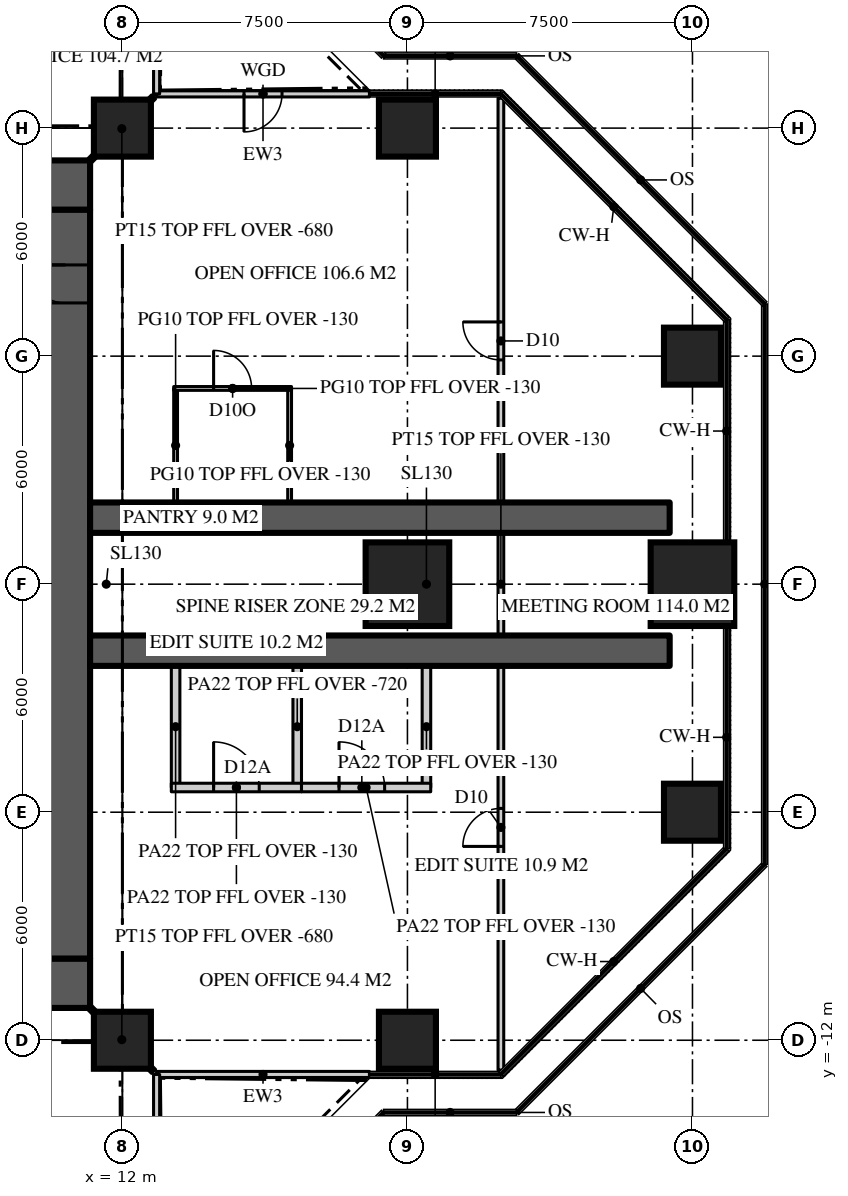
"""IFC4 building model, lengths in metres.
Left out: names, types, materials, properties, quantities, classifications, styles, units other than length and angle.
Written with IfcOpenShell. Run it as: python <this file> out.ifc"""

import sys

from ifc_helpers import new_model, si_unit, direction, frame, frame_2d, origin, origin_2d, place, context, subcontext, project, spatial, rectangle, extrude, element, fill, save


model = new_model("IFC4")
c1 = context("Model", 3, precision=1e-05, world=origin(), true_north=direction((0.0, 1.0)))
c2 = subcontext(c1, "Body", "Model", "MODEL_VIEW")
j1 = project(units=[si_unit("LENGTHUNIT", "METRE"), si_unit("PLANEANGLEUNIT", "RADIAN")], contexts=[c1])
p1 = place(None, origin())
s1 = spatial("IfcSite", under=j1, at=p1, CompositionType="ELEMENT")
p2 = place(p1, origin())
s2 = spatial("IfcBuilding", under=s1, at=p2, CompositionType="ELEMENT")
p3 = place(p2, frame((0.0, 0.0, 228.3)))
s3 = spatial("IfcBuildingStorey", under=s2, at=p3, CompositionType="ELEMENT", Elevation=228.3)
p4 = place(p3, frame((-11.15, 10.5, 0.0), z_axis=(0.0, 0.0, 1.0), x_axis=(1.0, 0.0, 0.0)))
e1 = element("IfcWall", 1, at=p4, inside=s3, PredefinedType="SHEAR", context=c2, shape_type="SweptSolid", body=[
    extrude(rectangle(XDim=22.3, YDim=1.3, at=frame_2d((11.15, 0.0))), origin(), (0.0, 0.0, 1.0), 3.9),
])
p5 = place(p4, frame((4.25, 0.0, 0.0)))
e2 = element("IfcOpeningElement", 2, at=p5, cuts=e1, PredefinedType="OPENING", context=c2, shape_type="SweptSolid", body=[
    extrude(rectangle(XDim=1.8, YDim=2.2, at=frame_2d((0.9, 1.1))), frame((0.0, 0.66, 0.0), z_axis=(0.0, -1.0, 0.0), x_axis=(1.0, 0.0, 0.0)), (0.0, 0.0, 1.0), 1.32),
])
p6 = place(p4, frame((16.25, 0.0, 0.0)))
e3 = element("IfcOpeningElement", 3, at=p6, cuts=e1, PredefinedType="OPENING", context=c2, shape_type="SweptSolid", body=[
    extrude(rectangle(XDim=1.8, YDim=2.2, at=frame_2d((0.9, 1.1))), frame((0.0, 0.66, 0.0), z_axis=(0.0, -1.0, 0.0), x_axis=(1.0, 0.0, 0.0)), (0.0, 0.0, 1.0), 1.32),
])
p7 = place(p3, frame((11.15, -10.5, 0.0), z_axis=(0.0, 0.0, 1.0), x_axis=(-1.0, 0.0, 0.0)))
e4 = element("IfcWall", 4, at=p7, inside=s3, PredefinedType="SHEAR", context=c2, shape_type="SweptSolid", body=[
    extrude(rectangle(XDim=22.3, YDim=1.3, at=frame_2d((11.15, 0.0))), origin(), (0.0, 0.0, 1.0), 3.9),
])
p8 = place(p7, frame((16.25, 0.0, 0.0)))
e5 = element("IfcOpeningElement", 5, at=p8, cuts=e4, PredefinedType="OPENING", context=c2, shape_type="SweptSolid", body=[
    extrude(rectangle(XDim=1.8, YDim=2.2, at=frame_2d((0.9, 1.1))), frame((0.0, 0.66, 0.0), z_axis=(0.0, -1.0, 0.0), x_axis=(1.0, 0.0, 0.0)), (0.0, 0.0, 1.0), 1.32),
])
p9 = place(p7, frame((4.25, 0.0, 0.0)))
e6 = element("IfcOpeningElement", 6, at=p9, cuts=e4, PredefinedType="OPENING", context=c2, shape_type="SweptSolid", body=[
    extrude(rectangle(XDim=1.8, YDim=2.2, at=frame_2d((0.9, 1.1))), frame((0.0, 0.66, 0.0), z_axis=(0.0, -1.0, 0.0), x_axis=(1.0, 0.0, 0.0)), (0.0, 0.0, 1.0), 1.32),
])
p10 = place(p3, frame((10.5, -9.85, 0.0), z_axis=(0.0, 0.0, 1.0), x_axis=(0.0, 1.0, 0.0)))
e7 = element("IfcWall", 7, at=p10, inside=s3, PredefinedType="SHEAR", context=c2, shape_type="SweptSolid", body=[
    extrude(rectangle(XDim=19.7, YDim=1.3, at=frame_2d((9.85, 0.0))), origin(), (0.0, 0.0, 1.0), 3.9),
])
p11 = place(p10, frame((17.25, 0.0, 0.0)))
e8 = element("IfcOpeningElement", 8, at=p11, cuts=e7, PredefinedType="OPENING", context=c2, shape_type="SweptSolid", body=[
    extrude(rectangle(XDim=1.0, YDim=2.2, at=frame_2d((0.5, 1.1))), frame((0.0, 0.66, 0.0), z_axis=(0.0, -1.0, 0.0), x_axis=(1.0, 0.0, 0.0)), (0.0, 0.0, 1.0), 1.32),
])
for number, where, z_axis, x_axis in (
    (9, (11.15, -1.75, 0.0), (0.0, 0.0, 1.0), (1.0, 0.0, 0.0)),
    (10, (11.15, 1.75, 0.0), (0.0, 0.0, 1.0), (1.0, 0.0, 0.0)),
):
    element("IfcWall", number, at=place(p3, frame(where, z_axis=z_axis, x_axis=x_axis)), inside=s3, PredefinedType="SHEAR", context=c2, shape_type="SweptSolid", body=[
        extrude(rectangle(XDim=15.25, YDim=0.8, at=frame_2d((7.625, 0.0))), origin(), (0.0, 0.0, 1.0), 3.9),
    ])
for number, where, z_axis, x_axis in (
    (11, (12.0, -12.0, 0.0), (0.0, 0.0, 1.0), (1.0, 0.0, 0.0)),
    (12, (19.5, -12.0, 0.0), (0.0, 0.0, 1.0), (1.0, 0.0, 0.0)),
    (13, (27.0, -6.0, 0.0), (0.0, 0.0, 1.0), (1.0, 0.0, 0.0)),
):
    element("IfcColumn", number, at=place(p3, frame(where, z_axis=z_axis, x_axis=x_axis)), inside=s3, PredefinedType="COLUMN", context=c2, shape_type="SweptSolid", body=[
        extrude(rectangle(XDim=1.5, YDim=1.5, at=origin_2d()), origin(), (0.0, 0.0, 1.0), 3.9),
    ])
for number, where, z_axis, x_axis in (
    (14, (19.5, 0.0, 0.0), (0.0, 0.0, 1.0), (1.0, 0.0, 0.0)),
    (15, (27.0, 0.0, 0.0), (0.0, 0.0, 1.0), (1.0, 0.0, 0.0)),
):
    element("IfcColumn", number, at=place(p3, frame(where, z_axis=z_axis, x_axis=x_axis)), inside=s3, PredefinedType="COLUMN", context=c2, shape_type="SweptSolid", body=[
        extrude(rectangle(XDim=2.2, YDim=2.2, at=origin_2d()), origin(), (0.0, 0.0, 1.0), 3.9),
    ])
for number, where, z_axis, x_axis in (
    (16, (27.0, 6.0, 0.0), (0.0, 0.0, 1.0), (1.0, 0.0, 0.0)),
    (17, (12.0, 12.0, 0.0), (0.0, 0.0, 1.0), (1.0, 0.0, 0.0)),
    (18, (19.5, 12.0, 0.0), (0.0, 0.0, 1.0), (1.0, 0.0, 0.0)),
):
    element("IfcColumn", number, at=place(p3, frame(where, z_axis=z_axis, x_axis=x_axis)), inside=s3, PredefinedType="COLUMN", context=c2, shape_type="SweptSolid", body=[
        extrude(rectangle(XDim=1.5, YDim=1.5, at=origin_2d()), origin(), (0.0, 0.0, 1.0), 3.9),
    ])
p12 = place(p3, frame((12.9, -12.9, 0.0), z_axis=(0.0, 0.0, 1.0), x_axis=(1.0, 0.0, 0.0)))
e19 = element("IfcWall", 19, at=p12, inside=s3, PredefinedType="SOLIDWALL", context=c2, shape_type="SweptSolid", body=[
    extrude(rectangle(XDim=5.6, YDim=0.16, at=frame_2d((2.8, 0.0))), origin(), (0.0, 0.0, 1.0), 3.77),
])
p13 = place(p3, frame((18.5, 12.9, 0.0), z_axis=(0.0, 0.0, 1.0), x_axis=(-1.0, 0.0, 0.0)))
e20 = element("IfcWall", 20, at=p13, inside=s3, PredefinedType="SOLIDWALL", context=c2, shape_type="SweptSolid", body=[
    extrude(rectangle(XDim=5.6, YDim=0.16, at=frame_2d((2.8, 0.0))), origin(), (0.0, 0.0, 1.0), 3.77),
])
p14 = place(p13, frame((2.3, 0.0, 0.0)))
e21 = element("IfcOpeningElement", 21, at=p14, cuts=e20, PredefinedType="OPENING", context=c2, shape_type="SweptSolid", body=[
    extrude(rectangle(XDim=1.0, YDim=2.2, at=frame_2d((0.5, 1.1))), frame((0.0, 0.09, 0.0), z_axis=(0.0, -1.0, 0.0), x_axis=(1.0, 0.0, 0.0)), (0.0, 0.0, 1.0), 0.18),
])
p15 = place(p3, frame((12.9, 12.9, 0.0), z_axis=(0.0, 0.0, 1.0), x_axis=(0.0, 1.0, 0.0)))
e22 = element("IfcWall", 22, at=p15, inside=s3, PredefinedType="SOLIDWALL", context=c2, shape_type="SweptSolid", body=[
    extrude(rectangle(XDim=5.6, YDim=0.16, at=frame_2d((2.8, 0.0))), origin(), (0.0, 0.0, 1.0), 3.77),
])
p16 = place(p3, frame((12.9, -18.5, 0.0), z_axis=(0.0, 0.0, 1.0), x_axis=(0.0, 1.0, 0.0)))
e23 = element("IfcWall", 23, at=p16, inside=s3, PredefinedType="SOLIDWALL", context=c2, shape_type="SweptSolid", body=[
    extrude(rectangle(XDim=5.6, YDim=0.16, at=frame_2d((2.8, 0.0))), origin(), (0.0, 0.0, 1.0), 3.77),
])
p17 = place(p16, frame((2.3, 0.0, 0.0)))
e24 = element("IfcOpeningElement", 24, at=p17, cuts=e23, PredefinedType="OPENING", context=c2, shape_type="SweptSolid", body=[
    extrude(rectangle(XDim=1.0, YDim=2.2, at=frame_2d((0.5, 1.1))), frame((0.0, 0.09, 0.0), z_axis=(0.0, -1.0, 0.0), x_axis=(1.0, 0.0, 0.0)), (0.0, 0.0, 1.0), 0.18),
])
p18 = place(p3, frame((21.959, -12.786, 0.0), z_axis=(0.0, 0.0, 1.0), x_axis=(0.0, 1.0, 0.0)))
e25 = element("IfcWall", 25, at=p18, inside=s3, PredefinedType="PARTITIONING", context=c2, shape_type="SweptSolid", body=[
    extrude(rectangle(XDim=25.573, YDim=0.15, at=frame_2d((12.786, 0.0))), origin(), (0.0, 0.0, 1.0), 3.77),
])
p19 = place(p18, frame((18.687, 0.0, 0.0)))
e26 = element("IfcOpeningElement", 26, at=p19, cuts=e25, PredefinedType="OPENING", context=c2, shape_type="SweptSolid", body=[
    extrude(rectangle(XDim=1.0, YDim=2.2, at=frame_2d((0.5, 1.1))), frame((0.0, 0.085, 0.0), z_axis=(0.0, -1.0, 0.0), x_axis=(1.0, 0.0, 0.0)), (0.0, 0.0, 1.0), 0.17),
])
p20 = place(p18, frame((5.886, 0.0, 0.0)))
e27 = element("IfcOpeningElement", 27, at=p20, cuts=e25, PredefinedType="OPENING", context=c2, shape_type="SweptSolid", body=[
    extrude(rectangle(XDim=1.0, YDim=2.2, at=frame_2d((0.5, 1.1))), frame((0.0, 0.085, 0.0), z_axis=(0.0, -1.0, 0.0), x_axis=(1.0, 0.0, 0.0)), (0.0, 0.0, 1.0), 0.17),
])
for number, where, z_axis, x_axis in (
    (28, (13.4, 2.15, 0.0), (0.0, 0.0, 1.0), (0.0, 1.0, 0.0)),
    (29, (16.4, 2.15, 0.0), (0.0, 0.0, 1.0), (0.0, 1.0, 0.0)),
):
    element("IfcWall", number, at=place(p3, frame(where, z_axis=z_axis, x_axis=x_axis)), inside=s3, PredefinedType="PARTITIONING", context=c2, shape_type="SweptSolid", body=[
        extrude(rectangle(XDim=3.0, YDim=0.1, at=frame_2d((1.5, 0.0))), origin(), (0.0, 0.0, 1.0), 3.77),
    ])
p21 = place(p3, frame((13.35, 5.15, 0.0), z_axis=(0.0, 0.0, 1.0), x_axis=(1.0, 0.0, 0.0)))
e30 = element("IfcWall", 30, at=p21, inside=s3, PredefinedType="PARTITIONING", context=c2, shape_type="SweptSolid", body=[
    extrude(rectangle(XDim=3.1, YDim=0.1, at=frame_2d((1.55, 0.0))), origin(), (0.0, 0.0, 1.0), 3.77),
])
p22 = place(p21, frame((1.05, 0.0, 0.0)))
e31 = element("IfcOpeningElement", 31, at=p22, cuts=e30, PredefinedType="OPENING", context=c2, shape_type="SweptSolid", body=[
    extrude(rectangle(XDim=1.0, YDim=2.2, at=frame_2d((0.5, 1.1))), frame((0.0, 0.06, 0.0), z_axis=(0.0, -1.0, 0.0), x_axis=(1.0, 0.0, 0.0)), (0.0, 0.0, 1.0), 0.12),
])
p23 = place(p3, frame((13.4, -2.15, 0.0), z_axis=(0.0, 0.0, 1.0), x_axis=(0.0, -1.0, 0.0)))
e32 = element("IfcWall", 32, at=p23, inside=s3, PredefinedType="PARTITIONING", context=c2, shape_type="SweptSolid", body=[
    extrude(rectangle(XDim=3.2, YDim=0.225, at=frame_2d((1.6, 0.0))), origin(), (0.0, 0.0, 1.0), 3.77),
])
p24 = place(p3, frame((16.6, -2.15, 0.0), z_axis=(0.0, 0.0, 1.0), x_axis=(0.0, -1.0, 0.0)))
e33 = element("IfcWall", 33, at=p24, inside=s3, PredefinedType="PARTITIONING", context=c2, shape_type="SweptSolid", body=[
    extrude(rectangle(XDim=3.2, YDim=0.225, at=frame_2d((1.6, 0.0))), origin(), (0.0, 0.0, 1.0), 3.18),
])
p25 = place(p3, frame((13.288, -5.35, 0.0), z_axis=(0.0, 0.0, 1.0), x_axis=(1.0, 0.0, 0.0)))
e34 = element("IfcWall", 34, at=p25, inside=s3, PredefinedType="PARTITIONING", context=c2, shape_type="SweptSolid", body=[
    extrude(rectangle(XDim=3.425, YDim=0.225, at=frame_2d((1.712, 0.0))), origin(), (0.0, 0.0, 1.0), 3.77),
])
p26 = place(p25, frame((1.113, 0.0, 0.0)))
e35 = element("IfcOpeningElement", 35, at=p26, cuts=e34, PredefinedType="OPENING", context=c2, shape_type="SweptSolid", body=[
    extrude(rectangle(XDim=1.2, YDim=2.2, at=frame_2d((0.6, 1.1))), frame((0.0, 0.123, 0.0), z_axis=(0.0, -1.0, 0.0), x_axis=(1.0, 0.0, 0.0)), (0.0, 0.0, 1.0), 0.245),
])
p27 = place(p3, frame((20.0, -2.15, 0.0), z_axis=(0.0, 0.0, 1.0), x_axis=(0.0, -1.0, 0.0)))
e36 = element("IfcWall", 36, at=p27, inside=s3, PredefinedType="PARTITIONING", context=c2, shape_type="SweptSolid", body=[
    extrude(rectangle(XDim=3.2, YDim=0.225, at=frame_2d((1.6, 0.0))), origin(), (0.0, 0.0, 1.0), 3.77),
])
p28 = place(p3, frame((16.712, -5.35, 0.0), z_axis=(0.0, 0.0, 1.0), x_axis=(1.0, 0.0, 0.0)))
e37 = element("IfcWall", 37, at=p28, inside=s3, PredefinedType="PARTITIONING", context=c2, shape_type="SweptSolid", body=[
    extrude(rectangle(XDim=3.4, YDim=0.225, at=frame_2d((1.7, 0.0))), origin(), (0.0, 0.0, 1.0), 3.77),
])
p29 = place(p28, frame((0.988, 0.0, 0.0)))
e38 = element("IfcOpeningElement", 38, at=p29, cuts=e37, PredefinedType="OPENING", context=c2, shape_type="SweptSolid", body=[
    extrude(rectangle(XDim=1.2, YDim=2.2, at=frame_2d((0.6, 1.1))), frame((0.0, 0.123, 0.0), z_axis=(0.0, -1.0, 0.0), x_axis=(1.0, 0.0, 0.0)), (0.0, 0.0, 1.0), 0.245),
])
for number, where, z_axis, x_axis in (
    (39, (11.15, 11.15, 0.0), (0.0, 0.0, 1.0), (0.707, 0.707, 0.0)),
    (40, (11.15, -11.15, 0.0), (0.0, 0.0, 1.0), (0.707, -0.707, 0.0)),
):
    element("IfcWall", number, at=place(p3, frame(where, z_axis=z_axis, x_axis=x_axis)), inside=s3, PredefinedType="PARTITIONING", context=c2, shape_type="SweptSolid", body=[
        extrude(rectangle(XDim=2.362, YDim=0.15, at=frame_2d((1.181, 0.0))), origin(), (0.0, 0.0, 1.0), 3.22),
    ])
p30 = place(p14, origin())
e41 = element("IfcDoor", 41, at=p30, inside=s3, OperationType="SINGLE_SWING_RIGHT", PredefinedType="DOOR", context=c2, shape_type="SweptSolid", body=[
    extrude(rectangle(XDim=1.0, YDim=2.2, at=frame_2d((0.5, 1.1))), frame((0.0, 0.025, 0.0), z_axis=(0.0, -1.0, 0.0), x_axis=(1.0, 0.0, 0.0)), (0.0, 0.0, 1.0), 0.05),
])
fill(e21, e41)
p31 = place(p11, origin())
e42 = element("IfcDoor", 42, at=p31, inside=s3, OperationType="SINGLE_SWING_RIGHT", PredefinedType="DOOR", context=c2, shape_type="SweptSolid", body=[
    extrude(rectangle(XDim=1.0, YDim=2.2, at=frame_2d((0.5, 1.1))), frame((0.0, 0.025, 0.0), z_axis=(0.0, -1.0, 0.0), x_axis=(1.0, 0.0, 0.0)), (0.0, 0.0, 1.0), 0.05),
])
fill(e8, e42)
p32 = place(p19, origin())
e43 = element("IfcDoor", 43, at=p32, inside=s3, OperationType="SINGLE_SWING_RIGHT", PredefinedType="DOOR", context=c2, shape_type="SweptSolid", body=[
    extrude(rectangle(XDim=1.0, YDim=2.2, at=frame_2d((0.5, 1.1))), frame((0.0, 0.025, 0.0), z_axis=(0.0, -1.0, 0.0), x_axis=(1.0, 0.0, 0.0)), (0.0, 0.0, 1.0), 0.05),
])
fill(e26, e43)
p33 = place(p20, origin())
e44 = element("IfcDoor", 44, at=p33, inside=s3, OperationType="SINGLE_SWING_LEFT", PredefinedType="DOOR", context=c2, shape_type="SweptSolid", body=[
    extrude(rectangle(XDim=1.0, YDim=2.2, at=frame_2d((0.5, 1.1))), frame((0.0, 0.025, 0.0), z_axis=(0.0, -1.0, 0.0), x_axis=(1.0, 0.0, 0.0)), (0.0, 0.0, 1.0), 0.05),
])
fill(e27, e44)
p34 = place(p22, origin())
e45 = element("IfcDoor", 45, at=p34, inside=s3, OperationType="SINGLE_SWING_LEFT", PredefinedType="DOOR", context=c2, shape_type="SweptSolid", body=[
    extrude(rectangle(XDim=1.0, YDim=2.2, at=frame_2d((0.5, 1.1))), frame((0.0, 0.025, 0.0), z_axis=(0.0, -1.0, 0.0), x_axis=(1.0, 0.0, 0.0)), (0.0, 0.0, 1.0), 0.05),
])
fill(e31, e45)
p35 = place(p26, origin())
e46 = element("IfcDoor", 46, at=p35, inside=s3, OperationType="SINGLE_SWING_LEFT", PredefinedType="DOOR", context=c2, shape_type="SweptSolid", body=[
    extrude(rectangle(XDim=1.2, YDim=2.2, at=frame_2d((0.6, 1.1))), frame((0.0, 0.025, 0.0), z_axis=(0.0, -1.0, 0.0), x_axis=(1.0, 0.0, 0.0)), (0.0, 0.0, 1.0), 0.05),
])
fill(e35, e46)
p36 = place(p29, origin())
e47 = element("IfcDoor", 47, at=p36, inside=s3, OperationType="SINGLE_SWING_LEFT", PredefinedType="DOOR", context=c2, shape_type="SweptSolid", body=[
    extrude(rectangle(XDim=1.2, YDim=2.2, at=frame_2d((0.6, 1.1))), frame((0.0, 0.025, 0.0), z_axis=(0.0, -1.0, 0.0), x_axis=(1.0, 0.0, 0.0)), (0.0, 0.0, 1.0), 0.05),
])
fill(e38, e47)
save(model, sys.argv[1])
